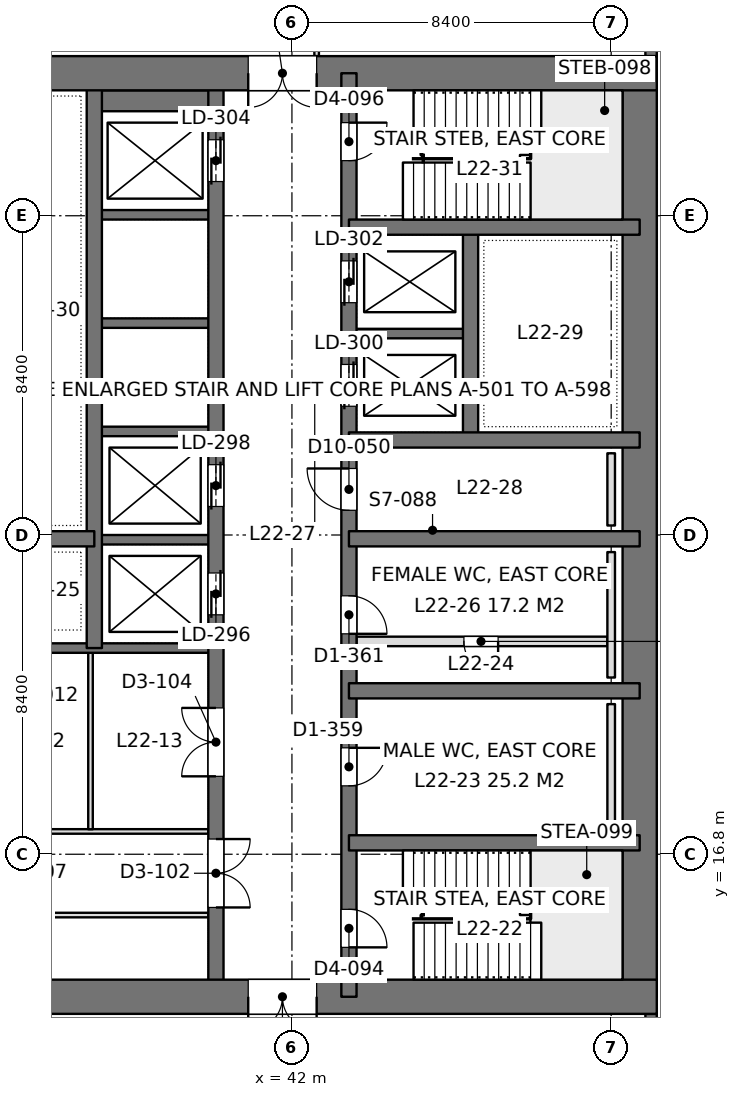
"""IFC4 building model, lengths in metres.
Left out: names, types, materials, properties, quantities, classifications, styles, units other than length and angle.
Written with IfcOpenShell. Run it as: python <this file> out.ifc"""

import sys

from ifc_helpers import new_model, si_unit, direction, frame, frame_2d, origin, place, context, subcontext, project, spatial, rectangle, extrude, element, fill, save


model = new_model("IFC4")
c1 = context("Model", 3, precision=1e-05, world=origin(), true_north=direction((0.0, 1.0)))
c2 = subcontext(c1, "Body", "Model", "MODEL_VIEW")
j1 = project(units=[si_unit("LENGTHUNIT", "METRE"), si_unit("PLANEANGLEUNIT", "RADIAN")], contexts=[c1])
p1 = place(None, origin())
s1 = spatial("IfcSite", under=j1, at=p1, CompositionType="ELEMENT")
p2 = place(p1, origin())
s2 = spatial("IfcBuilding", under=s1, at=p2, CompositionType="ELEMENT")
p3 = place(p2, frame((0.0, 0.0, 100.8)))
s3 = spatial("IfcBuildingStorey", under=s2, at=p3, CompositionType="ELEMENT", Elevation=100.8)
p4 = place(p3, frame((33.6, 13.05, 0.0), z_axis=(0.0, 0.0, 1.0), x_axis=(1.0, 0.0, 0.0)))
e1 = element("IfcWall", 1, at=p4, inside=s3, PredefinedType="SHEAR", context=c2, shape_type="SweptSolid", body=[
    extrude(rectangle(XDim=18.0, YDim=0.9, at=frame_2d((9.0, 0.0))), origin(), (0.0, 0.0, 1.0), 4.2),
])
p5 = place(p4, frame((7.25, 0.0, 0.0)))
e2 = element("IfcOpeningElement", 2, at=p5, cuts=e1, PredefinedType="OPENING", context=c2, shape_type="SweptSolid", body=[
    extrude(rectangle(XDim=1.8, YDim=2.4, at=frame_2d((0.9, 1.2))), frame((0.0, 0.46, 0.0), z_axis=(0.0, -1.0, 0.0), x_axis=(1.0, 0.0, 0.0)), (0.0, 0.0, 1.0), 0.92),
])
p6 = place(p3, frame((33.6, 37.35, 0.0), z_axis=(0.0, 0.0, 1.0), x_axis=(1.0, 0.0, 0.0)))
e3 = element("IfcWall", 3, at=p6, inside=s3, PredefinedType="SHEAR", context=c2, shape_type="SweptSolid", body=[
    extrude(rectangle(XDim=18.0, YDim=0.9, at=frame_2d((9.0, 0.0))), origin(), (0.0, 0.0, 1.0), 4.2),
])
p7 = place(p6, frame((7.25, 0.0, 0.0)))
e4 = element("IfcOpeningElement", 4, at=p7, cuts=e3, PredefinedType="OPENING", context=c2, shape_type="SweptSolid", body=[
    extrude(rectangle(XDim=1.8, YDim=2.4, at=frame_2d((0.9, 1.2))), frame((0.0, 0.46, 0.0), z_axis=(0.0, -1.0, 0.0), x_axis=(1.0, 0.0, 0.0)), (0.0, 0.0, 1.0), 0.92),
])
p8 = place(p3, frame((51.15, 13.05, 0.0), z_axis=(0.0, 0.0, 1.0), x_axis=(0.0, 1.0, 0.0)))
e5 = element("IfcWall", 5, at=p8, inside=s3, PredefinedType="SHEAR", context=c2, shape_type="SweptSolid", body=[
    extrude(rectangle(XDim=24.3, YDim=0.9, at=frame_2d((12.15, 0.0))), origin(), (0.0, 0.0, 1.0), 4.2),
])
p9 = place(p3, frame((43.5, 13.05, 0.0), z_axis=(0.0, 0.0, 1.0), x_axis=(0.0, 1.0, 0.0)))
e6 = element("IfcWall", 6, at=p9, inside=s3, PredefinedType="SHEAR", context=c2, shape_type="SweptSolid", body=[
    extrude(rectangle(XDim=24.3, YDim=0.4, at=frame_2d((12.15, 0.0))), origin(), (0.0, 0.0, 1.0), 4.2),
])
p10 = place(p9, frame((1.3, 0.0, 0.0)))
e7 = element("IfcOpeningElement", 7, at=p10, cuts=e6, PredefinedType="OPENING", context=c2, shape_type="SweptSolid", body=[
    extrude(rectangle(XDim=1.0, YDim=2.2, at=frame_2d((0.5, 1.1))), frame((0.0, 0.21, 0.0), z_axis=(0.0, -1.0, 0.0), x_axis=(1.0, 0.0, 0.0)), (0.0, 0.0, 1.0), 0.42),
])
p11 = place(p9, frame((22.0, 0.0, 0.0)))
e8 = element("IfcOpeningElement", 8, at=p11, cuts=e6, PredefinedType="OPENING", context=c2, shape_type="SweptSolid", body=[
    extrude(rectangle(XDim=1.0, YDim=2.2, at=frame_2d((0.5, 1.1))), frame((0.0, 0.21, 0.0), z_axis=(0.0, -1.0, 0.0), x_axis=(1.0, 0.0, 0.0)), (0.0, 0.0, 1.0), 0.42),
])
p12 = place(p9, frame((5.55, 0.0, 0.0)))
e9 = element("IfcOpeningElement", 9, at=p12, cuts=e6, PredefinedType="OPENING", context=c2, shape_type="SweptSolid", body=[
    extrude(rectangle(XDim=1.0, YDim=2.2, at=frame_2d((0.5, 1.1))), frame((0.0, 0.21, 0.0), z_axis=(0.0, -1.0, 0.0), x_axis=(1.0, 0.0, 0.0)), (0.0, 0.0, 1.0), 0.42),
])
p13 = place(p9, frame((9.55, 0.0, 0.0)))
e10 = element("IfcOpeningElement", 10, at=p13, cuts=e6, PredefinedType="OPENING", context=c2, shape_type="SweptSolid", body=[
    extrude(rectangle(XDim=1.0, YDim=2.2, at=frame_2d((0.5, 1.1))), frame((0.0, 0.21, 0.0), z_axis=(0.0, -1.0, 0.0), x_axis=(1.0, 0.0, 0.0)), (0.0, 0.0, 1.0), 0.42),
])
p14 = place(p9, frame((12.8, 0.0, 0.0)))
e11 = element("IfcOpeningElement", 11, at=p14, cuts=e6, PredefinedType="OPENING", context=c2, shape_type="SweptSolid", body=[
    extrude(rectangle(XDim=1.1, YDim=2.2, at=frame_2d((0.55, 1.1))), frame((0.0, 0.21, 0.0), z_axis=(0.0, -1.0, 0.0), x_axis=(1.0, 0.0, 0.0)), (0.0, 0.0, 1.0), 0.42),
])
p15 = place(p9, frame((15.538, 0.0, 0.0)))
e12 = element("IfcOpeningElement", 12, at=p15, cuts=e6, PredefinedType="OPENING", context=c2, shape_type="SweptSolid", body=[
    extrude(rectangle(XDim=1.1, YDim=2.2, at=frame_2d((0.55, 1.1))), frame((0.0, 0.21, 0.0), z_axis=(0.0, -1.0, 0.0), x_axis=(1.0, 0.0, 0.0)), (0.0, 0.0, 1.0), 0.42),
])
p16 = place(p9, frame((18.262, 0.0, 0.0)))
e13 = element("IfcOpeningElement", 13, at=p16, cuts=e6, PredefinedType="OPENING", context=c2, shape_type="SweptSolid", body=[
    extrude(rectangle(XDim=1.1, YDim=2.2, at=frame_2d((0.55, 1.1))), frame((0.0, 0.21, 0.0), z_axis=(0.0, -1.0, 0.0), x_axis=(1.0, 0.0, 0.0)), (0.0, 0.0, 1.0), 0.42),
])
p17 = place(p3, frame((40.0, 13.05, 0.0), z_axis=(0.0, 0.0, 1.0), x_axis=(0.0, 1.0, 0.0)))
e14 = element("IfcWall", 14, at=p17, inside=s3, PredefinedType="SHEAR", context=c2, shape_type="SweptSolid", body=[
    extrude(rectangle(XDim=24.3, YDim=0.4, at=frame_2d((12.15, 0.0))), origin(), (0.0, 0.0, 1.0), 4.2),
])
p18 = place(p17, frame((10.05, 0.0, 0.0)))
e15 = element("IfcOpeningElement", 15, at=p18, cuts=e14, PredefinedType="OPENING", context=c2, shape_type="SweptSolid", body=[
    extrude(rectangle(XDim=1.1, YDim=2.2, at=frame_2d((0.55, 1.1))), frame((0.0, 0.21, 0.0), z_axis=(0.0, -1.0, 0.0), x_axis=(1.0, 0.0, 0.0)), (0.0, 0.0, 1.0), 0.42),
])
p19 = place(p17, frame((12.9, 0.0, 0.0)))
e16 = element("IfcOpeningElement", 16, at=p19, cuts=e14, PredefinedType="OPENING", context=c2, shape_type="SweptSolid", body=[
    extrude(rectangle(XDim=1.1, YDim=2.2, at=frame_2d((0.55, 1.1))), frame((0.0, 0.21, 0.0), z_axis=(0.0, -1.0, 0.0), x_axis=(1.0, 0.0, 0.0)), (0.0, 0.0, 1.0), 0.42),
])
p20 = place(p17, frame((21.45, 0.0, 0.0)))
e17 = element("IfcOpeningElement", 17, at=p20, cuts=e14, PredefinedType="OPENING", context=c2, shape_type="SweptSolid", body=[
    extrude(rectangle(XDim=1.1, YDim=2.2, at=frame_2d((0.55, 1.1))), frame((0.0, 0.21, 0.0), z_axis=(0.0, -1.0, 0.0), x_axis=(1.0, 0.0, 0.0)), (0.0, 0.0, 1.0), 0.42),
])
p21 = place(p17, frame((2.35, 0.0, 0.0)))
e18 = element("IfcOpeningElement", 18, at=p21, cuts=e14, PredefinedType="OPENING", context=c2, shape_type="SweptSolid", body=[
    extrude(rectangle(XDim=1.8, YDim=2.4, at=frame_2d((0.9, 1.2))), frame((0.0, 0.21, 0.0), z_axis=(0.0, -1.0, 0.0), x_axis=(1.0, 0.0, 0.0)), (0.0, 0.0, 1.0), 0.42),
])
p22 = place(p17, frame((5.8, 0.0, 0.0)))
e19 = element("IfcOpeningElement", 19, at=p22, cuts=e14, PredefinedType="OPENING", context=c2, shape_type="SweptSolid", body=[
    extrude(rectangle(XDim=1.8, YDim=2.4, at=frame_2d((0.9, 1.2))), frame((0.0, 0.21, 0.0), z_axis=(0.0, -1.0, 0.0), x_axis=(1.0, 0.0, 0.0)), (0.0, 0.0, 1.0), 0.42),
])
p23 = place(p3, frame((36.8, 22.225, 0.0), z_axis=(0.0, 0.0, 1.0), x_axis=(0.0, 1.0, 0.0)))
e20 = element("IfcWall", 20, at=p23, inside=s3, PredefinedType="SHEAR", context=c2, shape_type="SweptSolid", body=[
    extrude(rectangle(XDim=15.125, YDim=0.4, at=frame_2d((7.562, 0.0))), origin(), (0.0, 0.0, 1.0), 4.2),
])
for number, where, z_axis, x_axis in (
    (21, (51.15, 17.1, 0.0), (0.0, 0.0, 1.0), (-1.0, 0.0, 0.0)),
    (22, (51.15, 21.1, 0.0), (0.0, 0.0, 1.0), (-1.0, 0.0, 0.0)),
    (23, (51.15, 25.1, 0.0), (0.0, 0.0, 1.0), (-1.0, 0.0, 0.0)),
    (24, (51.15, 27.7, 0.0), (0.0, 0.0, 1.0), (-1.0, 0.0, 0.0)),
    (25, (51.15, 33.3, 0.0), (0.0, 0.0, 1.0), (-1.0, 0.0, 0.0)),
):
    element("IfcWall", number, at=place(p3, frame(where, z_axis=z_axis, x_axis=x_axis)), inside=s3, PredefinedType="SHEAR", context=c2, shape_type="SweptSolid", body=[
        extrude(rectangle(XDim=7.65, YDim=0.4, at=frame_2d((3.825, 0.0))), origin(), (0.0, 0.0, 1.0), 4.2),
    ])
p24 = place(p3, frame((46.7, 27.7, 0.0), z_axis=(0.0, 0.0, 1.0), x_axis=(0.0, 1.0, 0.0)))
e26 = element("IfcWall", 26, at=p24, inside=s3, PredefinedType="SHEAR", context=c2, shape_type="SweptSolid", body=[
    extrude(rectangle(XDim=5.6, YDim=0.4, at=frame_2d((2.8, 0.0))), origin(), (0.0, 0.0, 1.0), 4.2),
])
p25 = place(p3, frame((46.7, 30.5, 0.0), z_axis=(0.0, 0.0, 1.0), x_axis=(-1.0, 0.0, 0.0)))
e27 = element("IfcWall", 27, at=p25, inside=s3, PredefinedType="SHEAR", context=c2, shape_type="SweptSolid", body=[
    extrude(rectangle(XDim=3.2, YDim=0.25, at=frame_2d((1.6, 0.0))), origin(), (0.0, 0.0, 1.0), 4.2),
])
p26 = place(p3, frame((36.8, 25.1, 0.0), z_axis=(0.0, 0.0, 1.0), x_axis=(-1.0, 0.0, 0.0)))
e28 = element("IfcWall", 28, at=p26, inside=s3, PredefinedType="SHEAR", context=c2, shape_type="SweptSolid", body=[
    extrude(rectangle(XDim=2.75, YDim=0.4, at=frame_2d((1.375, 0.0))), origin(), (0.0, 0.0, 1.0), 4.2),
])
p27 = place(p3, frame((40.0, 22.225, 0.0), z_axis=(0.0, 0.0, 1.0), x_axis=(-1.0, 0.0, 0.0)))
e29 = element("IfcWall", 29, at=p27, inside=s3, PredefinedType="SHEAR", context=c2, shape_type="SweptSolid", body=[
    extrude(rectangle(XDim=5.95, YDim=0.25, at=frame_2d((2.975, 0.0))), origin(), (0.0, 0.0, 1.0), 4.2),
])
for number, where, z_axis, x_axis in (
    (30, (40.0, 25.075, 0.0), (0.0, 0.0, 1.0), (-1.0, 0.0, 0.0)),
    (31, (40.0, 27.925, 0.0), (0.0, 0.0, 1.0), (-1.0, 0.0, 0.0)),
    (32, (40.0, 30.775, 0.0), (0.0, 0.0, 1.0), (-1.0, 0.0, 0.0)),
    (33, (40.0, 33.625, 0.0), (0.0, 0.0, 1.0), (-1.0, 0.0, 0.0)),
):
    element("IfcWall", number, at=place(p3, frame(where, z_axis=z_axis, x_axis=x_axis)), inside=s3, PredefinedType="SHEAR", context=c2, shape_type="SweptSolid", body=[
        extrude(rectangle(XDim=3.2, YDim=0.25, at=frame_2d((1.6, 0.0))), origin(), (0.0, 0.0, 1.0), 4.2),
    ])
p28 = place(p3, frame((40.0, 36.625, 0.0), z_axis=(0.0, 0.0, 1.0), x_axis=(-1.0, 0.0, 0.0)))
e34 = element("IfcWall", 34, at=p28, inside=s3, PredefinedType="SHEAR", context=c2, shape_type="SweptSolid", body=[
    extrude(rectangle(XDim=3.2, YDim=0.55, at=frame_2d((1.6, 0.0))), origin(), (0.0, 0.0, 1.0), 4.2),
])
p29 = place(p3, frame((51.45, 42.0, 0.0), z_axis=(0.0, 0.0, 1.0), x_axis=(0.0, -1.0, 0.0)))
e35 = element("IfcWall", 35, at=p29, inside=s3, PredefinedType="SOLIDWALL", context=c2, shape_type="SweptSolid", body=[
    extrude(rectangle(XDim=4.2, YDim=0.3, at=frame_2d((2.1, 0.0))), origin(), (0.0, 0.0, 1.0), 4.05),
])
p30 = place(p29, frame((0.9, 0.0, 0.9)))
e36 = element("IfcOpeningElement", 36, at=p30, cuts=e35, PredefinedType="OPENING", context=c2, shape_type="SweptSolid", body=[
    extrude(rectangle(XDim=2.4, YDim=1.9, at=frame_2d((1.2, 0.95))), frame((0.0, 0.16, 0.0), z_axis=(0.0, -1.0, 0.0), x_axis=(1.0, 0.0, 0.0)), (0.0, 0.0, 1.0), 0.32),
])
p31 = place(p3, frame((51.45, 12.6, 0.0), z_axis=(0.0, 0.0, 1.0), x_axis=(0.0, -1.0, 0.0)))
e37 = element("IfcWall", 37, at=p31, inside=s3, PredefinedType="SOLIDWALL", context=c2, shape_type="SweptSolid", body=[
    extrude(rectangle(XDim=4.2, YDim=0.3, at=frame_2d((2.1, 0.0))), origin(), (0.0, 0.0, 1.0), 4.05),
])
p32 = place(p31, frame((0.9, 0.0, 0.9)))
e38 = element("IfcOpeningElement", 38, at=p32, cuts=e37, PredefinedType="OPENING", context=c2, shape_type="SweptSolid", body=[
    extrude(rectangle(XDim=2.4, YDim=1.9, at=frame_2d((1.2, 0.95))), frame((0.0, 0.16, 0.0), z_axis=(0.0, -1.0, 0.0), x_axis=(1.0, 0.0, 0.0)), (0.0, 0.0, 1.0), 0.32),
])
p33 = place(p3, frame((33.898, 17.4, 0.0), z_axis=(0.0, 0.0, 1.0), x_axis=(1.0, 0.0, 0.0)))
e39 = element("IfcWall", 39, at=p33, inside=s3, PredefinedType="PARTITIONING", context=c2, shape_type="SweptSolid", body=[
    extrude(rectangle(XDim=5.904, YDim=0.12, at=frame_2d((2.952, 0.0))), origin(), (0.0, 0.0, 1.0), 3.55),
])
p34 = place(p33, frame((0.752, 0.0, 0.0)))
e40 = element("IfcOpeningElement", 40, at=p34, cuts=e39, PredefinedType="OPENING", context=c2, shape_type="SweptSolid", body=[
    extrude(rectangle(XDim=1.0, YDim=2.4, at=frame_2d((0.5, 1.2))), frame((0.0, 0.07, 0.0), z_axis=(0.0, -1.0, 0.0), x_axis=(1.0, 0.0, 0.0)), (0.0, 0.0, 1.0), 0.14),
])
p35 = place(p3, frame((36.7, 17.458, 0.0), z_axis=(0.0, 0.0, 1.0), x_axis=(0.0, 1.0, 0.0)))
e41 = element("IfcWall", 41, at=p35, inside=s3, PredefinedType="PARTITIONING", context=c2, shape_type="SweptSolid", body=[
    extrude(rectangle(XDim=4.644, YDim=0.12, at=frame_2d((2.322, 0.0))), origin(), (0.0, 0.0, 1.0), 3.6),
])
p36 = place(p3, frame((33.598, 15.2, 0.0), z_axis=(0.0, 0.0, 1.0), x_axis=(1.0, 0.0, 0.0)))
e42 = element("IfcWall", 42, at=p36, inside=s3, PredefinedType="PARTITIONING", context=c2, shape_type="SweptSolid", body=[
    extrude(rectangle(XDim=6.204, YDim=0.12, at=frame_2d((3.102, 0.0))), origin(), (0.0, 0.0, 1.0), 3.55),
])
p37 = place(p3, frame((42.65, 37.8, 0.0), z_axis=(0.0, 0.0, 1.0), x_axis=(0.0, 1.0, 0.0)))
e43 = element("IfcWall", 43, at=p37, inside=s3, PredefinedType="PARTITIONING", context=c2, shape_type="SweptSolid", body=[
    extrude(rectangle(XDim=2.0, YDim=0.12, at=frame_2d((1.0, 0.0))), origin(), (0.0, 0.0, 1.0), 4.05),
])
p38 = place(p3, frame((43.7, 22.4, 0.0), z_axis=(0.0, 0.0, 1.0), x_axis=(1.0, 0.0, 0.0)))
e44 = element("IfcWall", 44, at=p38, inside=s3, PredefinedType="PARTITIONING", context=c2, shape_type="SweptSolid", body=[
    extrude(rectangle(XDim=6.6, YDim=0.25, at=frame_2d((3.3, 0.0))), origin(), (0.0, 0.0, 1.0), 4.0),
])
p39 = place(p38, frame((2.825, 0.0, 0.0)))
e45 = element("IfcOpeningElement", 45, at=p39, cuts=e44, PredefinedType="OPENING", context=c2, shape_type="SweptSolid", body=[
    extrude(rectangle(XDim=0.9, YDim=2.2, at=frame_2d((0.45, 1.1))), frame((0.0, 0.135, 0.0), z_axis=(0.0, -1.0, 0.0), x_axis=(1.0, 0.0, 0.0)), (0.0, 0.0, 1.0), 0.27),
])
for number, where, z_axis, x_axis in (
    (46, (50.4, 17.45, 0.0), (0.0, 0.0, 1.0), (0.0, 1.0, 0.0)),
    (47, (50.4, 21.45, 0.0), (0.0, 0.0, 1.0), (0.0, 1.0, 0.0)),
):
    element("IfcWall", number, at=place(p3, frame(where, z_axis=z_axis, x_axis=x_axis)), inside=s3, PredefinedType="PLUMBINGWALL", context=c2, shape_type="SweptSolid", body=[
        extrude(rectangle(XDim=3.3, YDim=0.2, at=frame_2d((1.65, 0.0))), origin(), (0.0, 0.0, 1.0), 1.2),
    ])
p40 = place(p3, frame((50.4, 25.45, 0.0), z_axis=(0.0, 0.0, 1.0), x_axis=(0.0, 1.0, 0.0)))
e48 = element("IfcWall", 48, at=p40, inside=s3, PredefinedType="PLUMBINGWALL", context=c2, shape_type="SweptSolid", body=[
    extrude(rectangle(XDim=1.9, YDim=0.2, at=frame_2d((0.95, 0.0))), origin(), (0.0, 0.0, 1.0), 1.2),
])
p41 = place(p5, frame((1.8, 0.0, 0.0), z_axis=(0.0, 0.0, 1.0), x_axis=(-1.0, 0.0, 0.0)))
e49 = element("IfcDoor", 49, at=p41, inside=s3, OperationType="DOUBLE_DOOR_SINGLE_SWING", PredefinedType="DOOR", context=c2, shape_type="SweptSolid", body=[
    extrude(rectangle(XDim=1.8, YDim=2.4, at=frame_2d((0.9, 1.2))), frame((0.0, 0.025, 0.0), z_axis=(0.0, -1.0, 0.0), x_axis=(1.0, 0.0, 0.0)), (0.0, 0.0, 1.0), 0.05),
])
fill(e2, e49)
p42 = place(p7, frame((1.8, 0.0, 0.0), z_axis=(0.0, 0.0, 1.0), x_axis=(-1.0, 0.0, 0.0)))
e50 = element("IfcDoor", 50, at=p42, inside=s3, OperationType="DOUBLE_DOOR_SINGLE_SWING", PredefinedType="DOOR", context=c2, shape_type="SweptSolid", body=[
    extrude(rectangle(XDim=1.8, YDim=2.4, at=frame_2d((0.9, 1.2))), frame((0.0, 0.025, 0.0), z_axis=(0.0, -1.0, 0.0), x_axis=(1.0, 0.0, 0.0)), (0.0, 0.0, 1.0), 0.05),
])
fill(e4, e50)
p43 = place(p10, frame((1.0, 0.0, 0.0), z_axis=(0.0, 0.0, 1.0), x_axis=(-1.0, 0.0, 0.0)))
e51 = element("IfcDoor", 51, at=p43, inside=s3, OperationType="SINGLE_SWING_RIGHT", PredefinedType="DOOR", context=c2, shape_type="SweptSolid", body=[
    extrude(rectangle(XDim=1.0, YDim=2.2, at=frame_2d((0.5, 1.1))), frame((0.0, 0.025, 0.0), z_axis=(0.0, -1.0, 0.0), x_axis=(1.0, 0.0, 0.0)), (0.0, 0.0, 1.0), 0.05),
])
fill(e7, e51)
p44 = place(p11, frame((1.0, 0.0, 0.0), z_axis=(0.0, 0.0, 1.0), x_axis=(-1.0, 0.0, 0.0)))
e52 = element("IfcDoor", 52, at=p44, inside=s3, OperationType="SINGLE_SWING_LEFT", PredefinedType="DOOR", context=c2, shape_type="SweptSolid", body=[
    extrude(rectangle(XDim=1.0, YDim=2.2, at=frame_2d((0.5, 1.1))), frame((0.0, 0.025, 0.0), z_axis=(0.0, -1.0, 0.0), x_axis=(1.0, 0.0, 0.0)), (0.0, 0.0, 1.0), 0.05),
])
fill(e8, e52)
p45 = place(p12, frame((1.0, 0.0, 0.0), z_axis=(0.0, 0.0, 1.0), x_axis=(-1.0, 0.0, 0.0)))
e53 = element("IfcDoor", 53, at=p45, inside=s3, OperationType="SINGLE_SWING_LEFT", PredefinedType="DOOR", context=c2, shape_type="SweptSolid", body=[
    extrude(rectangle(XDim=1.0, YDim=2.2, at=frame_2d((0.5, 1.1))), frame((0.0, 0.025, 0.0), z_axis=(0.0, -1.0, 0.0), x_axis=(1.0, 0.0, 0.0)), (0.0, 0.0, 1.0), 0.05),
])
fill(e9, e53)
p46 = place(p13, frame((1.0, 0.0, 0.0), z_axis=(0.0, 0.0, 1.0), x_axis=(-1.0, 0.0, 0.0)))
e54 = element("IfcDoor", 54, at=p46, inside=s3, OperationType="SINGLE_SWING_RIGHT", PredefinedType="DOOR", context=c2, shape_type="SweptSolid", body=[
    extrude(rectangle(XDim=1.0, YDim=2.2, at=frame_2d((0.5, 1.1))), frame((0.0, 0.025, 0.0), z_axis=(0.0, -1.0, 0.0), x_axis=(1.0, 0.0, 0.0)), (0.0, 0.0, 1.0), 0.05),
])
fill(e10, e54)
p47 = place(p14, origin())
e55 = element("IfcDoor", 55, at=p47, inside=s3, OperationType="SINGLE_SWING_RIGHT", PredefinedType="DOOR", context=c2, shape_type="SweptSolid", body=[
    extrude(rectangle(XDim=1.1, YDim=2.2, at=frame_2d((0.55, 1.1))), frame((0.0, 0.025, 0.0), z_axis=(0.0, -1.0, 0.0), x_axis=(1.0, 0.0, 0.0)), (0.0, 0.0, 1.0), 0.05),
])
fill(e11, e55)
p48 = place(p18, origin())
e56 = element("IfcDoor", 56, at=p48, inside=s3, OperationType="DOUBLE_DOOR_SLIDING", PredefinedType="DOOR", context=c2, shape_type="SweptSolid", body=[
    extrude(rectangle(XDim=1.1, YDim=2.2, at=frame_2d((0.55, 1.1))), frame((0.0, 0.025, 0.0), z_axis=(0.0, -1.0, 0.0), x_axis=(1.0, 0.0, 0.0)), (0.0, 0.0, 1.0), 0.05),
])
fill(e15, e56)
p49 = place(p19, origin())
e57 = element("IfcDoor", 57, at=p49, inside=s3, OperationType="DOUBLE_DOOR_SLIDING", PredefinedType="DOOR", context=c2, shape_type="SweptSolid", body=[
    extrude(rectangle(XDim=1.1, YDim=2.2, at=frame_2d((0.55, 1.1))), frame((0.0, 0.025, 0.0), z_axis=(0.0, -1.0, 0.0), x_axis=(1.0, 0.0, 0.0)), (0.0, 0.0, 1.0), 0.05),
])
fill(e16, e57)
p50 = place(p20, origin())
e58 = element("IfcDoor", 58, at=p50, inside=s3, OperationType="DOUBLE_DOOR_SLIDING", PredefinedType="DOOR", context=c2, shape_type="SweptSolid", body=[
    extrude(rectangle(XDim=1.1, YDim=2.2, at=frame_2d((0.55, 1.1))), frame((0.0, 0.025, 0.0), z_axis=(0.0, -1.0, 0.0), x_axis=(1.0, 0.0, 0.0)), (0.0, 0.0, 1.0), 0.05),
])
fill(e17, e58)
p51 = place(p15, origin())
e59 = element("IfcDoor", 59, at=p51, inside=s3, OperationType="DOUBLE_DOOR_SLIDING", PredefinedType="DOOR", context=c2, shape_type="SweptSolid", body=[
    extrude(rectangle(XDim=1.1, YDim=2.2, at=frame_2d((0.55, 1.1))), frame((0.0, 0.025, 0.0), z_axis=(0.0, -1.0, 0.0), x_axis=(1.0, 0.0, 0.0)), (0.0, 0.0, 1.0), 0.05),
])
fill(e12, e59)
p52 = place(p16, origin())
e60 = element("IfcDoor", 60, at=p52, inside=s3, OperationType="DOUBLE_DOOR_SLIDING", PredefinedType="DOOR", context=c2, shape_type="SweptSolid", body=[
    extrude(rectangle(XDim=1.1, YDim=2.2, at=frame_2d((0.55, 1.1))), frame((0.0, 0.025, 0.0), z_axis=(0.0, -1.0, 0.0), x_axis=(1.0, 0.0, 0.0)), (0.0, 0.0, 1.0), 0.05),
])
fill(e13, e60)
p53 = place(p21, frame((1.8, 0.0, 0.0), z_axis=(0.0, 0.0, 1.0), x_axis=(-1.0, 0.0, 0.0)))
e61 = element("IfcDoor", 61, at=p53, inside=s3, OperationType="DOUBLE_DOOR_SINGLE_SWING", PredefinedType="DOOR", context=c2, shape_type="SweptSolid", body=[
    extrude(rectangle(XDim=1.8, YDim=2.4, at=frame_2d((0.9, 1.2))), frame((0.0, 0.025, 0.0), z_axis=(0.0, -1.0, 0.0), x_axis=(1.0, 0.0, 0.0)), (0.0, 0.0, 1.0), 0.05),
])
fill(e18, e61)
p54 = place(p22, origin())
e62 = element("IfcDoor", 62, at=p54, inside=s3, OperationType="DOUBLE_DOOR_SINGLE_SWING", PredefinedType="DOOR", context=c2, shape_type="SweptSolid", body=[
    extrude(rectangle(XDim=1.8, YDim=2.4, at=frame_2d((0.9, 1.2))), frame((0.0, 0.025, 0.0), z_axis=(0.0, -1.0, 0.0), x_axis=(1.0, 0.0, 0.0)), (0.0, 0.0, 1.0), 0.05),
])
fill(e19, e62)
p55 = place(p39, frame((0.9, 0.0, 0.0), z_axis=(0.0, 0.0, 1.0), x_axis=(-1.0, 0.0, 0.0)))
e63 = element("IfcDoor", 63, at=p55, inside=s3, OperationType="SINGLE_SWING_LEFT", PredefinedType="DOOR", context=c2, shape_type="SweptSolid", body=[
    extrude(rectangle(XDim=0.9, YDim=2.2, at=frame_2d((0.45, 1.1))), frame((0.0, 0.025, 0.0), z_axis=(0.0, -1.0, 0.0), x_axis=(1.0, 0.0, 0.0)), (0.0, 0.0, 1.0), 0.05),
])
fill(e45, e63)
save(model, sys.argv[1])
